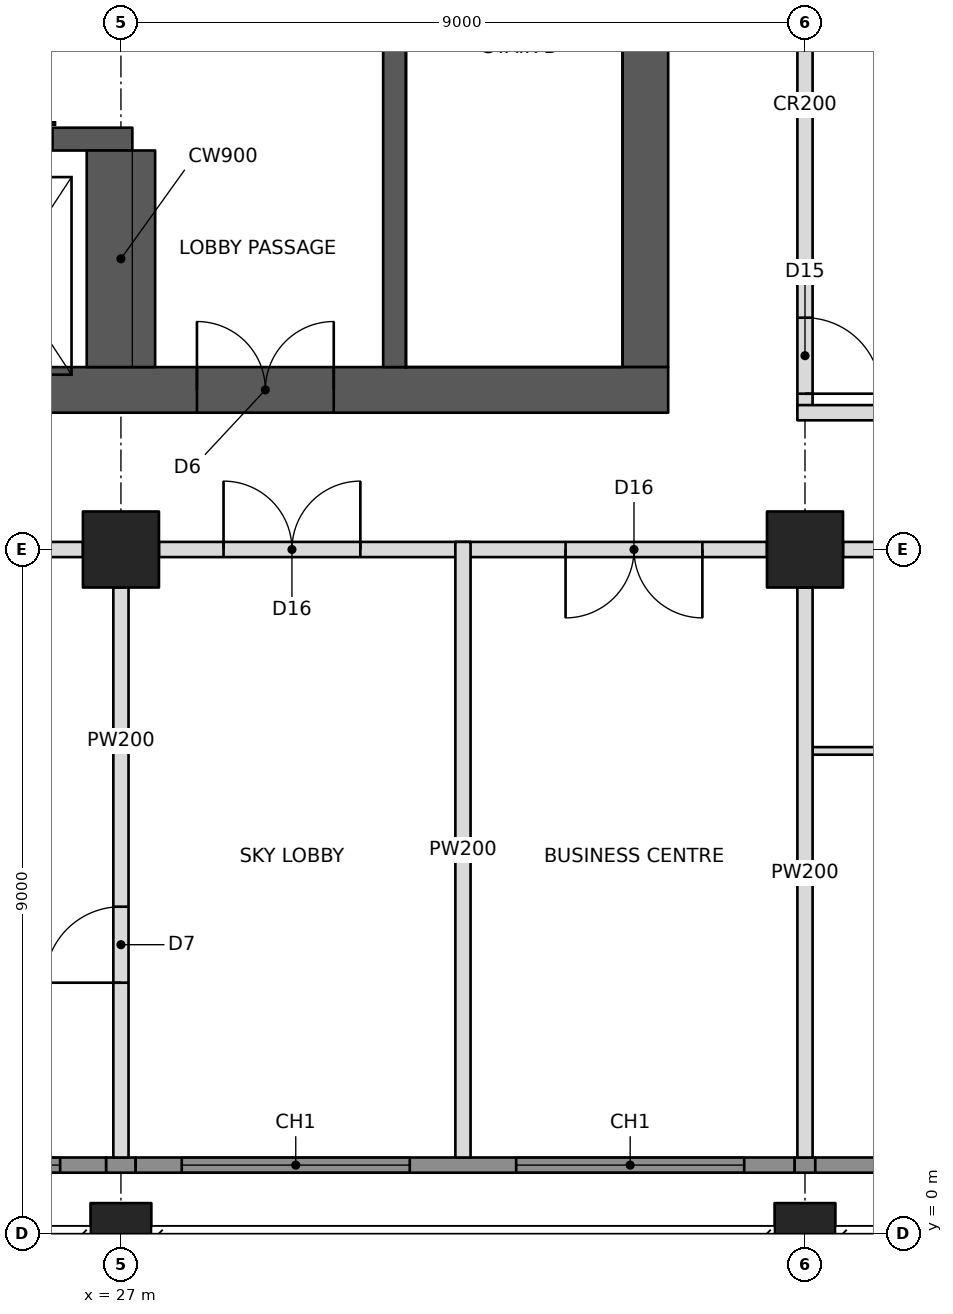
"""IFC4 building model, lengths in metres.
Left out: names, types, materials, properties, quantities, classifications, styles, units other than length and angle.
Written with IfcOpenShell. Run it as: python <this file> out.ifc"""

import sys

from ifc_helpers import new_model, si_unit, direction, frame, frame_2d, origin, origin_2d, place, context, subcontext, project, spatial, rectangle, hollow_rectangle, extrude, element, fill, save


model = new_model("IFC4")
c1 = context("Model", 3, precision=1e-05, world=origin(), true_north=direction((0.0, 1.0)))
c2 = subcontext(c1, "Body", "Model", "MODEL_VIEW")
j1 = project(units=[si_unit("LENGTHUNIT", "METRE"), si_unit("PLANEANGLEUNIT", "RADIAN")], contexts=[c1])
p1 = place(None, origin())
s1 = spatial("IfcSite", under=j1, at=p1, CompositionType="ELEMENT")
p2 = place(p1, origin())
s2 = spatial("IfcBuilding", under=s1, at=p2, CompositionType="ELEMENT")
p3 = place(p2, frame((0.0, 0.0, 94.2)))
s3 = spatial("IfcBuildingStorey", under=s2, at=p3, CompositionType="ELEMENT", Elevation=94.2)
p4 = place(p3, frame((27.0, 0.0, 0.0), z_axis=(0.0, 0.0, 1.0), x_axis=(1.0, 0.0, 0.0)))
e1 = element("IfcColumn", 1, at=p4, inside=s3, PredefinedType="COLUMN", context=c2, shape_type="SweptSolid", body=[
    extrude(hollow_rectangle(XDim=0.8, YDim=0.8, WallThickness=0.07, at=origin_2d()), origin(), (0.0, 0.0, 1.0), 3.4),
])
p5 = place(p3, frame((27.0, 9.0, 0.0), z_axis=(0.0, 0.0, 1.0), x_axis=(1.0, 0.0, 0.0)))
e2 = element("IfcColumn", 2, at=p5, inside=s3, PredefinedType="COLUMN", context=c2, shape_type="SweptSolid", body=[
    extrude(hollow_rectangle(XDim=1.0, YDim=1.0, WallThickness=0.1, at=origin_2d()), origin(), (0.0, 0.0, 1.0), 3.4),
])
p6 = place(p3, frame((36.0, 0.0, 0.0), z_axis=(0.0, 0.0, 1.0), x_axis=(1.0, 0.0, 0.0)))
e3 = element("IfcColumn", 3, at=p6, inside=s3, PredefinedType="COLUMN", context=c2, shape_type="SweptSolid", body=[
    extrude(hollow_rectangle(XDim=0.8, YDim=0.8, WallThickness=0.07, at=origin_2d()), origin(), (0.0, 0.0, 1.0), 3.4),
])
p7 = place(p3, frame((36.0, 9.0, 0.0), z_axis=(0.0, 0.0, 1.0), x_axis=(0.0, 1.0, 0.0)))
e4 = element("IfcColumn", 4, at=p7, inside=s3, PredefinedType="COLUMN", context=c2, shape_type="SweptSolid", body=[
    extrude(hollow_rectangle(XDim=1.0, YDim=1.0, WallThickness=0.1, at=origin_2d()), origin(), (0.0, 0.0, 1.0), 3.4),
])
p8 = place(p3, frame((10.8, 11.1, 0.0), z_axis=(0.0, 0.0, 1.0), x_axis=(1.0, 0.0, 0.0)))
e5 = element("IfcWall", 5, at=p8, inside=s3, PredefinedType="SHEAR", context=c2, shape_type="SweptSolid", body=[
    extrude(rectangle(XDim=23.4, YDim=0.6, at=frame_2d((11.7, 0.0))), origin(), (0.0, 0.0, 1.0), 3.4),
])
p9 = place(p8, frame((1.0, 0.0, 0.0)))
e6 = element("IfcOpeningElement", 6, at=p9, cuts=e5, PredefinedType="OPENING", context=c2, shape_type="SweptSolid", body=[
    extrude(rectangle(XDim=1.0, YDim=2.1, at=frame_2d((0.5, 1.05))), frame((0.0, 0.31, 0.0), z_axis=(0.0, -1.0, 0.0), x_axis=(1.0, 0.0, 0.0)), (0.0, 0.0, 1.0), 0.62),
])
p10 = place(p8, frame((17.2, 0.0, 0.0)))
e7 = element("IfcOpeningElement", 7, at=p10, cuts=e5, PredefinedType="OPENING", context=c2, shape_type="SweptSolid", body=[
    extrude(rectangle(XDim=1.8, YDim=2.1, at=frame_2d((0.9, 1.05))), frame((0.0, 0.31, 0.0), z_axis=(0.0, -1.0, 0.0), x_axis=(1.0, 0.0, 0.0)), (0.0, 0.0, 1.0), 0.62),
])
p11 = place(p3, frame((33.9, 11.4, 0.0), z_axis=(0.0, 0.0, 1.0), x_axis=(0.0, 1.0, 0.0)))
e8 = element("IfcWall", 8, at=p11, inside=s3, PredefinedType="SHEAR", context=c2, shape_type="SweptSolid", body=[
    extrude(rectangle(XDim=13.2, YDim=0.6, at=frame_2d((6.6, 0.0))), origin(), (0.0, 0.0, 1.0), 3.4),
])
p12 = place(p3, frame((18.15, 14.4, 0.0), z_axis=(0.0, 0.0, 1.0), x_axis=(1.0, 0.0, 0.0)))
e9 = element("IfcWall", 9, at=p12, inside=s3, PredefinedType="SHEAR", context=c2, shape_type="SweptSolid", body=[
    extrude(rectangle(XDim=9.0, YDim=0.3, at=frame_2d((4.5, 0.0))), origin(), (0.0, 0.0, 1.0), 3.4),
])
p13 = place(p12, frame((0.8, 0.0, 0.0)))
e10 = element("IfcOpeningElement", 10, at=p13, cuts=e9, PredefinedType="OPENING", context=c2, shape_type="SweptSolid", body=[
    extrude(rectangle(XDim=1.1, YDim=2.1, at=frame_2d((0.55, 1.05))), frame((0.0, 0.16, 0.0), z_axis=(0.0, -1.0, 0.0), x_axis=(1.0, 0.0, 0.0)), (0.0, 0.0, 1.0), 0.32),
])
p14 = place(p12, frame((3.8, 0.0, 0.0)))
e11 = element("IfcOpeningElement", 11, at=p14, cuts=e9, PredefinedType="OPENING", context=c2, shape_type="SweptSolid", body=[
    extrude(rectangle(XDim=1.1, YDim=2.1, at=frame_2d((0.55, 1.05))), frame((0.0, 0.16, 0.0), z_axis=(0.0, -1.0, 0.0), x_axis=(1.0, 0.0, 0.0)), (0.0, 0.0, 1.0), 0.32),
])
p15 = place(p12, frame((6.75, 0.0, 0.0)))
e12 = element("IfcOpeningElement", 12, at=p15, cuts=e9, PredefinedType="OPENING", context=c2, shape_type="SweptSolid", body=[
    extrude(rectangle(XDim=1.2, YDim=2.1, at=frame_2d((0.6, 1.05))), frame((0.0, 0.16, 0.0), z_axis=(0.0, -1.0, 0.0), x_axis=(1.0, 0.0, 0.0)), (0.0, 0.0, 1.0), 0.32),
])
p16 = place(p3, frame((27.0, 11.4, 0.0), z_axis=(0.0, 0.0, 1.0), x_axis=(0.0, 1.0, 0.0)))
e13 = element("IfcWall", 13, at=p16, inside=s3, PredefinedType="SHEAR", context=c2, shape_type="SweptSolid", body=[
    extrude(rectangle(XDim=2.85, YDim=0.9, at=frame_2d((1.425, 0.0))), origin(), (0.0, 0.0, 1.0), 3.4),
])
p17 = place(p3, frame((30.6, 11.4, 0.0), z_axis=(0.0, 0.0, 1.0), x_axis=(0.0, 1.0, 0.0)))
e14 = element("IfcWall", 14, at=p17, inside=s3, PredefinedType="SHEAR", context=c2, shape_type="SweptSolid", body=[
    extrude(rectangle(XDim=13.2, YDim=0.3, at=frame_2d((6.6, 0.0))), origin(), (0.0, 0.0, 1.0), 3.4),
])
p18 = place(p3, frame((27.5, 9.0, 0.0), z_axis=(0.0, 0.0, 1.0), x_axis=(1.0, 0.0, 0.0)))
e15 = element("IfcWall", 15, at=p18, inside=s3, PredefinedType="PARTITIONING", context=c2, shape_type="SweptSolid", body=[
    extrude(rectangle(XDim=8.0, YDim=0.2, at=frame_2d((4.0, 0.0))), origin(), (0.0, 0.0, 1.0), 2.405),
])
p19 = place(p18, frame((0.85, 0.0, 0.0)))
e16 = element("IfcOpeningElement", 16, at=p19, cuts=e15, PredefinedType="OPENING", context=c2, shape_type="SweptSolid", body=[
    extrude(rectangle(XDim=1.8, YDim=2.4, at=frame_2d((0.9, 1.2))), frame((0.0, 0.11, 0.0), z_axis=(0.0, -1.0, 0.0), x_axis=(1.0, 0.0, 0.0)), (0.0, 0.0, 1.0), 0.22),
])
p20 = place(p18, frame((5.35, 0.0, 0.0)))
e17 = element("IfcOpeningElement", 17, at=p20, cuts=e15, PredefinedType="OPENING", context=c2, shape_type="SweptSolid", body=[
    extrude(rectangle(XDim=1.8, YDim=2.4, at=frame_2d((0.9, 1.2))), frame((0.0, 0.11, 0.0), z_axis=(0.0, -1.0, 0.0), x_axis=(1.0, 0.0, 0.0)), (0.0, 0.0, 1.0), 0.22),
])
p21 = place(p3, frame((36.5, 9.0, 0.0), z_axis=(0.0, 0.0, 1.0), x_axis=(1.0, 0.0, 0.0)))
e18 = element("IfcWall", 18, at=p21, inside=s3, PredefinedType="PARTITIONING", context=c2, shape_type="SweptSolid", body=[
    extrude(rectangle(XDim=7.5, YDim=0.2, at=frame_2d((3.75, 0.0))), origin(), (0.0, 0.0, 1.0), 2.438),
])
p22 = place(p21, frame((6.35, 0.0, 0.0)))
e19 = element("IfcOpeningElement", 19, at=p22, cuts=e18, PredefinedType="OPENING", context=c2, shape_type="SweptSolid", body=[
    extrude(rectangle(XDim=0.9, YDim=2.1, at=frame_2d((0.45, 1.05))), frame((0.0, 0.11, 0.0), z_axis=(0.0, -1.0, 0.0), x_axis=(1.0, 0.0, 0.0)), (0.0, 0.0, 1.0), 0.22),
])
p23 = place(p3, frame((36.0, 10.8, 0.0), z_axis=(0.0, 0.0, 1.0), x_axis=(0.0, 1.0, 0.0)))
e20 = element("IfcWall", 20, at=p23, inside=s3, PredefinedType="PARTITIONING", context=c2, shape_type="SweptSolid", body=[
    extrude(rectangle(XDim=6.7, YDim=0.2, at=frame_2d((3.35, 0.0))), origin(), (0.0, 0.0, 1.0), 2.405),
])
p24 = place(p23, frame((0.25, 0.0, 0.0)))
e21 = element("IfcOpeningElement", 21, at=p24, cuts=e20, PredefinedType="OPENING", context=c2, shape_type="SweptSolid", body=[
    extrude(rectangle(XDim=1.0, YDim=2.1, at=frame_2d((0.5, 1.05))), frame((0.0, 0.11, 0.0), z_axis=(0.0, -1.0, 0.0), x_axis=(1.0, 0.0, 0.0)), (0.0, 0.0, 1.0), 0.22),
])
p25 = place(p3, frame((35.9, 10.8, 0.0), z_axis=(0.0, 0.0, 1.0), x_axis=(1.0, 0.0, 0.0)))
e22 = element("IfcWall", 22, at=p25, inside=s3, PredefinedType="PARTITIONING", context=c2, shape_type="SweptSolid", body=[
    extrude(rectangle(XDim=8.1, YDim=0.2, at=frame_2d((4.05, 0.0))), origin(), (0.0, 0.0, 1.0), 2.404),
])
p26 = place(p3, frame((27.0, 8.5, 0.0), z_axis=(0.0, 0.0, 1.0), x_axis=(0.0, -1.0, 0.0)))
e23 = element("IfcWall", 23, at=p26, inside=s3, PredefinedType="PARTITIONING", context=c2, shape_type="SweptSolid", body=[
    extrude(rectangle(XDim=7.5, YDim=0.2, at=frame_2d((3.75, 0.0))), origin(), (0.0, 0.0, 1.0), 2.405),
])
p27 = place(p26, frame((4.2, 0.0, 0.0)))
e24 = element("IfcOpeningElement", 24, at=p27, cuts=e23, PredefinedType="OPENING", context=c2, shape_type="SweptSolid", body=[
    extrude(rectangle(XDim=1.0, YDim=2.1, at=frame_2d((0.5, 1.05))), frame((0.0, 0.11, 0.0), z_axis=(0.0, -1.0, 0.0), x_axis=(1.0, 0.0, 0.0)), (0.0, 0.0, 1.0), 0.22),
])
p28 = place(p3, frame((36.0, 8.5, 0.0), z_axis=(0.0, 0.0, 1.0), x_axis=(0.0, -1.0, 0.0)))
e25 = element("IfcWall", 25, at=p28, inside=s3, PredefinedType="PARTITIONING", context=c2, shape_type="SweptSolid", body=[
    extrude(rectangle(XDim=7.5, YDim=0.2, at=frame_2d((3.75, 0.0))), origin(), (0.0, 0.0, 1.0), 2.438),
])
p29 = place(p3, frame((23.65, 9.0, 0.0), z_axis=(0.0, 0.0, 1.0), x_axis=(1.0, 0.0, 0.0)))
e26 = element("IfcWall", 26, at=p29, inside=s3, PredefinedType="PARTITIONING", context=c2, shape_type="SweptSolid", body=[
    extrude(rectangle(XDim=2.85, YDim=0.2, at=frame_2d((1.425, 0.0))), origin(), (0.0, 0.0, 1.0), 2.405),
])
p30 = place(p3, frame((31.5, 9.1, 0.0), z_axis=(0.0, 0.0, 1.0), x_axis=(0.0, -1.0, 0.0)))
e27 = element("IfcWall", 27, at=p30, inside=s3, PredefinedType="PARTITIONING", context=c2, shape_type="SweptSolid", body=[
    extrude(rectangle(XDim=8.1, YDim=0.2, at=frame_2d((4.05, 0.0))), origin(), (0.0, 0.0, 1.0), 2.404),
])
p31 = place(p3, frame((36.1, 6.35, 0.0), z_axis=(0.0, 0.0, 1.0), x_axis=(1.0, 0.0, 0.0)))
e28 = element("IfcWall", 28, at=p31, inside=s3, PredefinedType="PARTITIONING", context=c2, shape_type="SweptSolid", body=[
    extrude(rectangle(XDim=3.45, YDim=0.1, at=frame_2d((1.725, 0.0))), origin(), (0.0, 0.0, 1.0), 2.438),
])
p32 = place(p3, frame((18.194, 0.9, 0.0), z_axis=(0.0, 0.0, 1.0), x_axis=(1.0, 0.0, 0.0)))
e29 = element("IfcWall", 29, at=p32, inside=s3, PredefinedType="SOLIDWALL", context=c2, shape_type="SweptSolid", body=[
    extrude(rectangle(XDim=8.612, YDim=0.2, at=frame_2d((4.306, 0.0))), origin(), (0.0, 0.0, 1.0), 3.2),
])
p33 = place(p32, frame((0.606, 0.0, 0.6)))
e30 = element("IfcOpeningElement", 30, at=p33, cuts=e29, PredefinedType="OPENING", context=c2, shape_type="SweptSolid", body=[
    extrude(rectangle(XDim=3.0, YDim=2.2, at=frame_2d((1.5, 1.1))), frame((0.0, 0.11, 0.0), z_axis=(0.0, -1.0, 0.0), x_axis=(1.0, 0.0, 0.0)), (0.0, 0.0, 1.0), 0.22),
])
p34 = place(p32, frame((5.006, 0.0, 0.6)))
e31 = element("IfcOpeningElement", 31, at=p34, cuts=e29, PredefinedType="OPENING", context=c2, shape_type="SweptSolid", body=[
    extrude(rectangle(XDim=3.0, YDim=2.2, at=frame_2d((1.5, 1.1))), frame((0.0, 0.11, 0.0), z_axis=(0.0, -1.0, 0.0), x_axis=(1.0, 0.0, 0.0)), (0.0, 0.0, 1.0), 0.22),
])
p35 = place(p3, frame((26.806, 0.9, 0.0), z_axis=(0.0, 0.0, 1.0), x_axis=(1.0, 0.0, 0.0)))
e32 = element("IfcWall", 32, at=p35, inside=s3, PredefinedType="SOLIDWALL", context=c2, shape_type="SweptSolid", body=[
    extrude(rectangle(XDim=0.388, YDim=0.2, at=frame_2d((0.194, 0.0))), origin(), (0.0, 0.0, 1.0), 2.404),
])
p36 = place(p3, frame((27.194, 0.9, 0.0), z_axis=(0.0, 0.0, 1.0), x_axis=(1.0, 0.0, 0.0)))
e33 = element("IfcWall", 33, at=p36, inside=s3, PredefinedType="SOLIDWALL", context=c2, shape_type="SweptSolid", body=[
    extrude(rectangle(XDim=8.671, YDim=0.2, at=frame_2d((4.335, 0.0))), origin(), (0.0, 0.0, 1.0), 3.2),
])
p37 = place(p36, frame((0.606, 0.0, 0.6)))
e34 = element("IfcOpeningElement", 34, at=p37, cuts=e33, PredefinedType="OPENING", context=c2, shape_type="SweptSolid", body=[
    extrude(rectangle(XDim=3.0, YDim=2.2, at=frame_2d((1.5, 1.1))), frame((0.0, 0.11, 0.0), z_axis=(0.0, -1.0, 0.0), x_axis=(1.0, 0.0, 0.0)), (0.0, 0.0, 1.0), 0.22),
])
p38 = place(p36, frame((5.006, 0.0, 0.6)))
e35 = element("IfcOpeningElement", 35, at=p38, cuts=e33, PredefinedType="OPENING", context=c2, shape_type="SweptSolid", body=[
    extrude(rectangle(XDim=3.0, YDim=2.2, at=frame_2d((1.5, 1.1))), frame((0.0, 0.11, 0.0), z_axis=(0.0, -1.0, 0.0), x_axis=(1.0, 0.0, 0.0)), (0.0, 0.0, 1.0), 0.22),
])
p39 = place(p3, frame((35.865, 0.9, 0.0), z_axis=(0.0, 0.0, 1.0), x_axis=(1.0, 0.0, 0.0)))
e36 = element("IfcWall", 36, at=p39, inside=s3, PredefinedType="SOLIDWALL", context=c2, shape_type="SweptSolid", body=[
    extrude(rectangle(XDim=0.271, YDim=0.2, at=frame_2d((0.135, 0.0))), origin(), (0.0, 0.0, 1.0), 2.438),
])
p40 = place(p3, frame((36.135, 0.9, 0.0), z_axis=(0.0, 0.0, 1.0), x_axis=(1.0, 0.0, 0.0)))
e37 = element("IfcWall", 37, at=p40, inside=s3, PredefinedType="SOLIDWALL", context=c2, shape_type="SweptSolid", body=[
    extrude(rectangle(XDim=5.865, YDim=0.2, at=frame_2d((2.932, 0.0))), origin(), (0.0, 0.0, 1.0), 3.2),
])
p41 = place(p40, frame((1.415, 0.0, 0.6)))
e38 = element("IfcOpeningElement", 38, at=p41, cuts=e37, PredefinedType="OPENING", context=c2, shape_type="SweptSolid", body=[
    extrude(rectangle(XDim=3.0, YDim=2.2, at=frame_2d((1.5, 1.1))), frame((0.0, 0.11, 0.0), z_axis=(0.0, -1.0, 0.0), x_axis=(1.0, 0.0, 0.0)), (0.0, 0.0, 1.0), 0.22),
])
p42 = place(p34, origin())
e39 = element("IfcWindow", 39, at=p42, inside=s3, PartitioningType="TRIPLE_PANEL_VERTICAL", PredefinedType="WINDOW", context=c2, shape_type="SweptSolid", body=[
    extrude(rectangle(XDim=3.0, YDim=2.2, at=frame_2d((1.5, 1.1))), frame((0.0, 0.03, 0.0), z_axis=(0.0, -1.0, 0.0), x_axis=(1.0, 0.0, 0.0)), (0.0, 0.0, 1.0), 0.06),
])
fill(e31, e39)
p43 = place(p37, origin())
e40 = element("IfcWindow", 40, at=p43, inside=s3, PartitioningType="TRIPLE_PANEL_VERTICAL", PredefinedType="WINDOW", context=c2, shape_type="SweptSolid", body=[
    extrude(rectangle(XDim=3.0, YDim=2.2, at=frame_2d((1.5, 1.1))), frame((0.0, 0.03, 0.0), z_axis=(0.0, -1.0, 0.0), x_axis=(1.0, 0.0, 0.0)), (0.0, 0.0, 1.0), 0.06),
])
fill(e34, e40)
p44 = place(p38, origin())
e41 = element("IfcWindow", 41, at=p44, inside=s3, PartitioningType="TRIPLE_PANEL_VERTICAL", PredefinedType="WINDOW", context=c2, shape_type="SweptSolid", body=[
    extrude(rectangle(XDim=3.0, YDim=2.2, at=frame_2d((1.5, 1.1))), frame((0.0, 0.03, 0.0), z_axis=(0.0, -1.0, 0.0), x_axis=(1.0, 0.0, 0.0)), (0.0, 0.0, 1.0), 0.06),
])
fill(e35, e41)
p45 = place(p27, frame((1.0, 0.0, 0.0), z_axis=(0.0, 0.0, 1.0), x_axis=(-1.0, 0.0, 0.0)))
e42 = element("IfcDoor", 42, at=p45, inside=s3, OperationType="SINGLE_SWING_LEFT", PredefinedType="DOOR", context=c2, shape_type="SweptSolid", body=[
    extrude(rectangle(XDim=1.0, YDim=2.1, at=frame_2d((0.5, 1.05))), frame((0.0, 0.025, 0.0), z_axis=(0.0, -1.0, 0.0), x_axis=(1.0, 0.0, 0.0)), (0.0, 0.0, 1.0), 0.05),
])
fill(e24, e42)
p46 = place(p19, origin())
e43 = element("IfcDoor", 43, at=p46, inside=s3, OperationType="DOUBLE_DOOR_SINGLE_SWING", PredefinedType="DOOR", context=c2, shape_type="SweptSolid", body=[
    extrude(rectangle(XDim=1.8, YDim=2.4, at=frame_2d((0.9, 1.2))), frame((0.0, 0.025, 0.0), z_axis=(0.0, -1.0, 0.0), x_axis=(1.0, 0.0, 0.0)), (0.0, 0.0, 1.0), 0.05),
])
fill(e16, e43)
p47 = place(p20, frame((1.8, 0.0, 0.0), z_axis=(0.0, 0.0, 1.0), x_axis=(-1.0, 0.0, 0.0)))
e44 = element("IfcDoor", 44, at=p47, inside=s3, OperationType="DOUBLE_DOOR_SINGLE_SWING", PredefinedType="DOOR", context=c2, shape_type="SweptSolid", body=[
    extrude(rectangle(XDim=1.8, YDim=2.4, at=frame_2d((0.9, 1.2))), frame((0.0, 0.025, 0.0), z_axis=(0.0, -1.0, 0.0), x_axis=(1.0, 0.0, 0.0)), (0.0, 0.0, 1.0), 0.05),
])
fill(e17, e44)
p48 = place(p24, frame((1.0, 0.0, 0.0), z_axis=(0.0, 0.0, 1.0), x_axis=(-1.0, 0.0, 0.0)))
e45 = element("IfcDoor", 45, at=p48, inside=s3, OperationType="SINGLE_SWING_RIGHT", PredefinedType="DOOR", context=c2, shape_type="SweptSolid", body=[
    extrude(rectangle(XDim=1.0, YDim=2.1, at=frame_2d((0.5, 1.05))), frame((0.0, 0.025, 0.0), z_axis=(0.0, -1.0, 0.0), x_axis=(1.0, 0.0, 0.0)), (0.0, 0.0, 1.0), 0.05),
])
fill(e21, e45)
p49 = place(p10, origin())
e46 = element("IfcDoor", 46, at=p49, inside=s3, OperationType="DOUBLE_DOOR_SINGLE_SWING", PredefinedType="DOOR", context=c2, shape_type="SweptSolid", body=[
    extrude(rectangle(XDim=1.8, YDim=2.1, at=frame_2d((0.9, 1.05))), frame((0.0, 0.025, 0.0), z_axis=(0.0, -1.0, 0.0), x_axis=(1.0, 0.0, 0.0)), (0.0, 0.0, 1.0), 0.05),
])
fill(e7, e46)
save(model, sys.argv[1])
